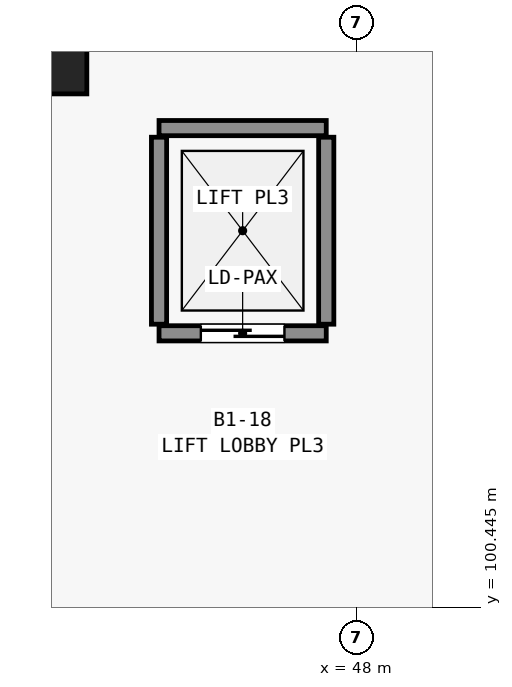
"""IFC4 building model, lengths in metres.
Left out: names, types, materials, properties, quantities, classifications, styles, units other than length and angle.
Written with IfcOpenShell. Run it as: python <this file> out.ifc"""

import sys

from ifc_helpers import new_model, si_unit, direction, frame, frame_2d, origin, origin_2d, place, context, subcontext, project, spatial, rectangle, extrude, element, fill, save


model = new_model("IFC4")
c1 = context("Model", 3, precision=1e-05, world=origin(), true_north=direction((0.0, 1.0)))
c2 = subcontext(c1, "Body", "Model", "MODEL_VIEW")
j1 = project(units=[si_unit("LENGTHUNIT", "METRE"), si_unit("PLANEANGLEUNIT", "RADIAN")], contexts=[c1])
p1 = place(None, origin())
s1 = spatial("IfcSite", under=j1, at=p1, CompositionType="ELEMENT")
p2 = place(p1, origin())
s2 = spatial("IfcBuilding", under=s1, at=p2, CompositionType="ELEMENT")
p3 = place(p2, frame((0.0, 0.0, -5.4)))
s3 = spatial("IfcBuildingStorey", under=s2, at=p3, CompositionType="ELEMENT", Elevation=-5.4)
p4 = place(p3, frame((44.0, 107.8, 0.0), z_axis=(0.0, 0.0, 1.0), x_axis=(1.0, 0.0, 0.0)))
e1 = element("IfcColumn", 1, at=p4, inside=s3, PredefinedType="PILASTER", context=c2, shape_type="SweptSolid", body=[
    extrude(rectangle(XDim=0.9, YDim=1.2, at=origin_2d()), origin(), (0.0, 0.0, 1.0), 5.4),
])
p5 = place(p3, frame((45.4, 104.05, 0.0), z_axis=(0.0, 0.0, 1.0), x_axis=(1.0, 0.0, 0.0)))
e2 = element("IfcWall", 2, at=p5, inside=s3, PredefinedType="STANDARD", context=c2, shape_type="SweptSolid", body=[
    extrude(rectangle(XDim=2.2, YDim=0.2, at=frame_2d((1.1, 0.0))), origin(), (0.0, 0.0, 1.0), 4.96),
])
p6 = place(p5, frame((0.55, 0.0, 0.0)))
e3 = element("IfcOpeningElement", 3, at=p6, cuts=e2, PredefinedType="OPENING", context=c2, shape_type="SweptSolid", body=[
    extrude(rectangle(XDim=1.1, YDim=2.15, at=frame_2d((0.55, 1.075))), frame((0.0, 0.11, 0.0), z_axis=(0.0, -1.0, 0.0), x_axis=(1.0, 0.0, 0.0)), (0.0, 0.0, 1.0), 0.22),
])
p7 = place(p3, frame((45.4, 106.75, 0.0), z_axis=(0.0, 0.0, 1.0), x_axis=(1.0, 0.0, 0.0)))
e4 = element("IfcWall", 4, at=p7, inside=s3, PredefinedType="STANDARD", context=c2, shape_type="SweptSolid", body=[
    extrude(rectangle(XDim=2.2, YDim=0.2, at=frame_2d((1.1, 0.0))), origin(), (0.0, 0.0, 1.0), 4.96),
])
for number, where, z_axis, x_axis in (
    (5, (45.4, 104.17, 0.0), (0.0, 0.0, 1.0), (0.0, 1.0, 0.0)),
    (6, (47.6, 104.17, 0.0), (0.0, 0.0, 1.0), (0.0, 1.0, 0.0)),
):
    element("IfcWall", number, at=place(p3, frame(where, z_axis=z_axis, x_axis=x_axis)), inside=s3, PredefinedType="STANDARD", context=c2, shape_type="SweptSolid", body=[
        extrude(rectangle(XDim=2.46, YDim=0.2, at=frame_2d((1.23, 0.0))), origin(), (0.0, 0.0, 1.0), 4.96),
    ])
p8 = place(p6, origin())
e7 = element("IfcDoor", 7, at=p8, inside=s3, OperationType="SLIDING_TO_LEFT", PredefinedType="DOOR", context=c2, shape_type="SweptSolid", body=[
    extrude(rectangle(XDim=1.1, YDim=2.15, at=frame_2d((0.55, 1.075))), frame((0.0, 0.025, 0.0), z_axis=(0.0, -1.0, 0.0), x_axis=(1.0, 0.0, 0.0)), (0.0, 0.0, 1.0), 0.05),
])
fill(e3, e7)
save(model, sys.argv[1])
